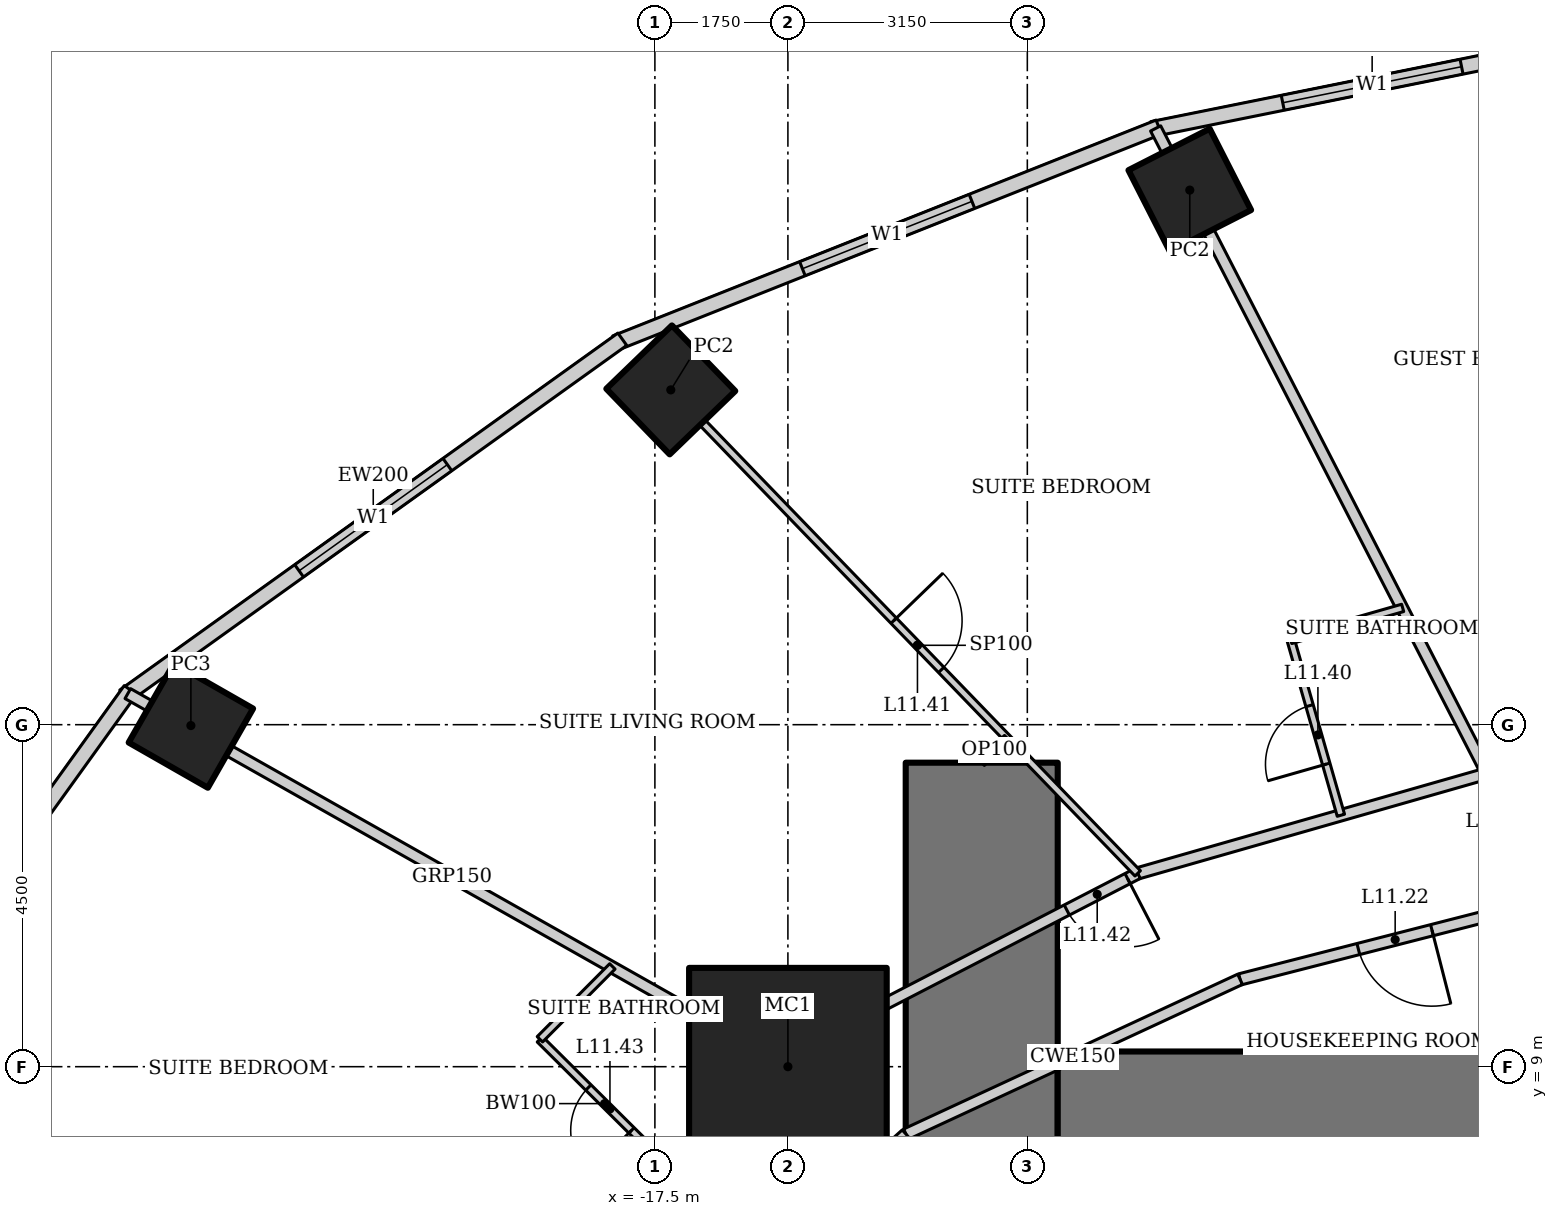
"""IFC4 building model, lengths in metres.
Left out: names, types, materials, properties, quantities, classifications, styles, units other than length and angle.
Written with IfcOpenShell. Run it as: python <this file> out.ifc"""

import sys

from ifc_helpers import new_model, si_unit, direction, frame, frame_2d, origin, origin_2d, place, context, subcontext, project, spatial, rectangle, hollow_rectangle, extrude, element, fill, save


model = new_model("IFC4")
c1 = context("Model", 3, precision=1e-05, world=origin(), true_north=direction((0.0, 1.0)))
c2 = subcontext(c1, "Body", "Model", "MODEL_VIEW")
j1 = project(units=[si_unit("LENGTHUNIT", "METRE"), si_unit("PLANEANGLEUNIT", "RADIAN")], contexts=[c1])
p1 = place(None, origin())
s1 = spatial("IfcSite", under=j1, at=p1, CompositionType="ELEMENT")
p2 = place(p1, origin())
s2 = spatial("IfcBuilding", under=s1, at=p2, CompositionType="ELEMENT")
p3 = place(p2, frame((0.0, 0.0, 55.0)))
s3 = spatial("IfcBuildingStorey", under=s2, at=p3, CompositionType="ELEMENT", Elevation=55.0)
p4 = place(p3, frame((-15.75, 9.0, 0.0), z_axis=(0.0, 0.0, 1.0), x_axis=(1.0, 0.0, 0.0)))
e1 = element("IfcColumn", 1, at=p4, inside=s3, PredefinedType="COLUMN", context=c2, shape_type="SweptSolid", body=[
    extrude(hollow_rectangle(XDim=2.6, YDim=2.6, WallThickness=0.13, at=origin_2d()), origin(), (0.0, 0.0, 1.0), 3.6),
])
for number, where, z_axis, x_axis in (
    (2, (-10.463, 20.534, 0.0), (0.0, 0.0, 1.0), (0.891, 0.454, 0.0)),
    (3, (-17.291, 17.905, 0.0), (0.0, 0.0, 1.0), (0.719, 0.695, 0.0)),
):
    element("IfcColumn", number, at=place(p3, frame(where, z_axis=z_axis, x_axis=x_axis)), inside=s3, PredefinedType="COLUMN", context=c2, shape_type="SweptSolid", body=[
        extrude(hollow_rectangle(XDim=1.2, YDim=1.2, WallThickness=0.1, at=origin_2d()), origin(), (0.0, 0.0, 1.0), 3.6),
    ])
p5 = place(p3, frame((-23.605, 13.489, 0.0), z_axis=(0.0, 0.0, 1.0), x_axis=(0.496139221777, 0.86824298017, 0.0)))
e4 = element("IfcColumn", 4, at=p5, inside=s3, PredefinedType="COLUMN", context=c2, shape_type="SweptSolid", body=[
    extrude(hollow_rectangle(XDim=1.2, YDim=1.2, WallThickness=0.12, at=origin_2d()), origin(), (0.0, 0.0, 1.0), 3.6),
])
p6 = place(p3, frame((-13.2, 13.0, 0.0), z_axis=(0.0, 0.0, 1.0), x_axis=(0.0, -1.0, 0.0)))
e5 = element("IfcWall", 5, at=p6, inside=s3, PredefinedType="SHEAR", context=c2, shape_type="SweptSolid", body=[
    extrude(rectangle(XDim=26.0, YDim=2.0, at=frame_2d((13.0, 0.0))), origin(), (0.0, 0.0, 1.0), 3.6),
])
p7 = place(p6, frame((12.1, 0.0, 0.0)))
e6 = element("IfcOpeningElement", 6, at=p7, cuts=e5, PredefinedType="OPENING", context=c2, shape_type="SweptSolid", body=[
    extrude(rectangle(XDim=1.8, YDim=2.1, at=frame_2d((0.9, 1.05))), frame((0.0, 1.01, 0.0), z_axis=(0.0, -1.0, 0.0), x_axis=(1.0, 0.0, 0.0)), (0.0, 0.0, 1.0), 2.02),
])
p8 = place(p3, frame((12.2, 8.0, 0.0), z_axis=(0.0, 0.0, 1.0), x_axis=(-1.0, 0.0, 0.0)))
e7 = element("IfcWall", 7, at=p8, inside=s3, PredefinedType="SHEAR", context=c2, shape_type="SweptSolid", body=[
    extrude(rectangle(XDim=24.4, YDim=2.4, at=frame_2d((12.2, 0.0))), origin(), (0.0, 0.0, 1.0), 3.6),
])
p9 = place(p3, frame((-5.17, 22.504, 0.0), z_axis=(0.0, 0.0, 1.0), x_axis=(-0.980251657452, -0.197754110105, 0.0)))
e8 = element("IfcWall", 8, at=p9, inside=s3, PredefinedType="SOLIDWALL", context=c2, shape_type="SweptSolid", body=[
    extrude(rectangle(XDim=5.904, YDim=0.2, at=frame_2d((2.952, 0.0))), origin(), (0.0, 0.0, 1.0), 3.45),
])
p10 = place(p9, frame((1.752, 0.0, 0.5)))
e9 = element("IfcOpeningElement", 9, at=p10, cuts=e8, PredefinedType="OPENING", context=c2, shape_type="SweptSolid", body=[
    extrude(rectangle(XDim=2.4, YDim=2.2, at=frame_2d((1.2, 1.1))), frame((0.0, 0.11, 0.0), z_axis=(0.0, -1.0, 0.0), x_axis=(1.0, 0.0, 0.0)), (0.0, 0.0, 1.0), 0.22),
])
p11 = place(p3, frame((-10.869, 21.363, 0.0), z_axis=(0.0, 0.0, 1.0), x_axis=(-0.929358351251, -0.369178892895, 0.0)))
e10 = element("IfcWall", 10, at=p11, inside=s3, PredefinedType="SOLIDWALL", context=c2, shape_type="SweptSolid", body=[
    extrude(rectangle(XDim=7.692, YDim=0.2, at=frame_2d((3.846, 0.0))), origin(), (0.0, 0.0, 1.0), 3.45),
])
p12 = place(p11, frame((2.646, 0.0, 0.5)))
e11 = element("IfcOpeningElement", 11, at=p12, cuts=e10, PredefinedType="OPENING", context=c2, shape_type="SweptSolid", body=[
    extrude(rectangle(XDim=2.4, YDim=2.2, at=frame_2d((1.2, 1.1))), frame((0.0, 0.11, 0.0), z_axis=(0.0, -1.0, 0.0), x_axis=(1.0, 0.0, 0.0)), (0.0, 0.0, 1.0), 0.22),
])
p13 = place(p3, frame((-17.929, 18.572, 0.0), z_axis=(0.0, 0.0, 1.0), x_axis=(-0.812791321576, -0.582554948112, 0.0)))
e12 = element("IfcWall", 12, at=p13, inside=s3, PredefinedType="SOLIDWALL", context=c2, shape_type="SweptSolid", body=[
    extrude(rectangle(XDim=8.063, YDim=0.2, at=frame_2d((4.032, 0.0))), origin(), (0.0, 0.0, 1.0), 3.45),
])
p14 = place(p13, frame((2.832, 0.0, 0.5)))
e13 = element("IfcOpeningElement", 13, at=p14, cuts=e12, PredefinedType="OPENING", context=c2, shape_type="SweptSolid", body=[
    extrude(rectangle(XDim=2.4, YDim=2.2, at=frame_2d((1.2, 1.1))), frame((0.0, 0.11, 0.0), z_axis=(0.0, -1.0, 0.0), x_axis=(1.0, 0.0, 0.0)), (0.0, 0.0, 1.0), 0.22),
])
p15 = place(p3, frame((-24.4, 13.957, 0.0), z_axis=(0.0, 0.0, 1.0), x_axis=(-0.583937613703, -0.811798536155, 0.0)))
e14 = element("IfcWall", 14, at=p15, inside=s3, PredefinedType="SOLIDWALL", context=c2, shape_type="SweptSolid", body=[
    extrude(rectangle(XDim=8.323, YDim=0.2, at=frame_2d((4.162, 0.0))), origin(), (0.0, 0.0, 1.0), 3.45),
])
p16 = place(p15, frame((2.961, 0.0, 0.5)))
e15 = element("IfcOpeningElement", 15, at=p16, cuts=e14, PredefinedType="OPENING", context=c2, shape_type="SweptSolid", body=[
    extrude(rectangle(XDim=2.4, YDim=2.2, at=frame_2d((1.2, 1.1))), frame((0.0, 0.11, 0.0), z_axis=(0.0, -1.0, 0.0), x_axis=(1.0, 0.0, 0.0)), (0.0, 0.0, 1.0), 0.22),
])
p17 = place(p3, frame((-10.912, 21.346, 0.0), z_axis=(0.0, 0.0, 1.0), x_axis=(0.456950233066, -0.889492262193, 0.0)))
e16 = element("IfcWall", 16, at=p17, inside=s3, PredefinedType="PARTITIONING", context=c2, shape_type="SweptSolid", body=[
    extrude(rectangle(XDim=9.542, YDim=0.15, at=frame_2d((4.771, 0.0))), origin(), (0.0, 0.0, 1.0), 2.528),
])
p18 = place(p3, frame((-24.435, 13.909, 0.0), z_axis=(0.0, 0.0, 1.0), x_axis=(0.870612006791, -0.491970256856, 0.0)))
e17 = element("IfcWall", 17, at=p18, inside=s3, PredefinedType="PARTITIONING", context=c2, shape_type="SweptSolid", body=[
    extrude(rectangle(XDim=9.802, YDim=0.15, at=frame_2d((4.901, 0.0))), origin(), (0.0, 0.0, 1.0), 2.693),
])
p19 = place(p3, frame((-6.552, 12.858, 0.0), z_axis=(0.0, 0.0, 1.0), x_axis=(-0.961464178199, -0.27493023486, 0.0)))
e18 = element("IfcWall", 18, at=p19, inside=s3, PredefinedType="PARTITIONING", context=c2, shape_type="SweptSolid", body=[
    extrude(rectangle(XDim=4.78, YDim=0.15, at=frame_2d((2.39, 0.0))), origin(), (0.0, 0.0, 1.0), 3.45),
])
p20 = place(p3, frame((-11.147, 11.544, 0.0), z_axis=(0.0, 0.0, 1.0), x_axis=(-0.888333171507, -0.459199495209, 0.0)))
e19 = element("IfcWall", 19, at=p20, inside=s3, PredefinedType="PARTITIONING", context=c2, shape_type="SweptSolid", body=[
    extrude(rectangle(XDim=5.351, YDim=0.15, at=frame_2d((2.676, 0.0))), origin(), (0.0, 0.0, 1.0), 3.45),
])
p21 = place(p20, frame((0.15, 0.0, 0.0)))
e20 = element("IfcOpeningElement", 20, at=p21, cuts=e19, PredefinedType="OPENING", context=c2, shape_type="SweptSolid", body=[
    extrude(rectangle(XDim=0.9, YDim=2.1, at=frame_2d((0.45, 1.05))), frame((0.0, 0.085, 0.0), z_axis=(0.0, -1.0, 0.0), x_axis=(1.0, 0.0, 0.0)), (0.0, 0.0, 1.0), 0.17),
])
p22 = place(p3, frame((-15.901, 9.086, 0.0), z_axis=(0.0, 0.0, 1.0), x_axis=(-0.705121546414, -0.709086457904, 0.0)))
e21 = element("IfcWall", 21, at=p22, inside=s3, PredefinedType="PARTITIONING", context=c2, shape_type="SweptSolid", body=[
    extrude(rectangle(XDim=5.788, YDim=0.15, at=frame_2d((2.894, 0.0))), origin(), (0.0, 0.0, 1.0), 3.45),
])
p23 = place(p3, frame((-5.706, 11.198, 0.0), z_axis=(0.0, 0.0, 1.0), x_axis=(-0.968705891355, -0.248211393886, 0.0)))
e22 = element("IfcWall", 22, at=p23, inside=s3, PredefinedType="PARTITIONING", context=c2, shape_type="SweptSolid", body=[
    extrude(rectangle(XDim=4.228, YDim=0.15, at=frame_2d((2.114, 0.0))), origin(), (0.0, 0.0, 1.0), 3.45),
])
p24 = place(p23, frame((1.621, 0.0, 0.0)))
e23 = element("IfcOpeningElement", 23, at=p24, cuts=e22, PredefinedType="OPENING", context=c2, shape_type="SweptSolid", body=[
    extrude(rectangle(XDim=1.0, YDim=2.1, at=frame_2d((0.5, 1.05))), frame((0.0, 0.085, 0.0), z_axis=(0.0, -1.0, 0.0), x_axis=(1.0, 0.0, 0.0)), (0.0, 0.0, 1.0), 0.17),
])
p25 = place(p3, frame((-9.801, 10.149, 0.0), z_axis=(0.0, 0.0, 1.0), x_axis=(-0.907279653965, -0.420527798727, 0.0)))
e24 = element("IfcWall", 24, at=p25, inside=s3, PredefinedType="PARTITIONING", context=c2, shape_type="SweptSolid", body=[
    extrude(rectangle(XDim=4.844, YDim=0.15, at=frame_2d((2.422, 0.0))), origin(), (0.0, 0.0, 1.0), 3.45),
])
p26 = place(p3, frame((-14.196, 8.112, 0.0), z_axis=(0.0, 0.0, 1.0), x_axis=(-0.742194222, -0.670184852731, 0.0)))
e25 = element("IfcWall", 25, at=p26, inside=s3, PredefinedType="PARTITIONING", context=c2, shape_type="SweptSolid", body=[
    extrude(rectangle(XDim=5.347, YDim=0.15, at=frame_2d((2.673, 0.0))), origin(), (0.0, 0.0, 1.0), 3.45),
])
p27 = place(p26, frame((2.173, 0.0, 0.0)))
e26 = element("IfcOpeningElement", 26, at=p27, cuts=e25, PredefinedType="OPENING", context=c2, shape_type="SweptSolid", body=[
    extrude(rectangle(XDim=1.0, YDim=2.1, at=frame_2d((0.5, 1.05))), frame((0.0, 0.085, 0.0), z_axis=(0.0, -1.0, 0.0), x_axis=(1.0, 0.0, 0.0)), (0.0, 0.0, 1.0), 0.17),
])
p28 = place(p3, frame((-8.474, 12.308, 0.0), z_axis=(0.0, 0.0, 1.0), x_axis=(-0.27497640313, 0.961450975205, 0.0)))
e27 = element("IfcWall", 27, at=p28, inside=s3, PredefinedType="PARTITIONING", context=c2, shape_type="SweptSolid", body=[
    extrude(rectangle(XDim=2.4, YDim=0.1, at=frame_2d((1.2, 0.0))), origin(), (0.0, 0.0, 1.0), 3.45),
])
p29 = place(p28, frame((0.7, 0.0, 0.0)))
e28 = element("IfcOpeningElement", 28, at=p29, cuts=e27, PredefinedType="OPENING", context=c2, shape_type="SweptSolid", body=[
    extrude(rectangle(XDim=0.8, YDim=2.1, at=frame_2d((0.4, 1.05))), frame((0.0, 0.06, 0.0), z_axis=(0.0, -1.0, 0.0), x_axis=(1.0, 0.0, 0.0)), (0.0, 0.0, 1.0), 0.12),
])
p30 = place(p3, frame((-9.134, 14.615, 0.0), z_axis=(0.0, 0.0, 1.0), x_axis=(0.96145775668, 0.274952690695, 0.0)))
e29 = element("IfcWall", 29, at=p30, inside=s3, PredefinedType="PARTITIONING", context=c2, shape_type="SweptSolid", body=[
    extrude(rectangle(XDim=1.532, YDim=0.1, at=frame_2d((0.766, 0.0))), origin(), (0.0, 0.0, 1.0), 3.45),
])
p31 = place(p3, frame((-16.944, 17.545, 0.0), z_axis=(0.0, 0.0, 1.0), x_axis=(0.694680670522, -0.71931826475, 0.0)))
e30 = element("IfcWall", 30, at=p31, inside=s3, PredefinedType="PARTITIONING", context=c2, shape_type="SweptSolid", body=[
    extrude(rectangle(XDim=8.344, YDim=0.1, at=frame_2d((4.172, 0.0))), origin(), (0.0, 0.0, 1.0), 2.528),
])
p32 = place(p31, frame((3.722, 0.0, 0.0)))
e31 = element("IfcOpeningElement", 31, at=p32, cuts=e30, PredefinedType="OPENING", context=c2, shape_type="SweptSolid", body=[
    extrude(rectangle(XDim=0.9, YDim=2.1, at=frame_2d((0.45, 1.05))), frame((0.0, 0.06, 0.0), z_axis=(0.0, -1.0, 0.0), x_axis=(1.0, 0.0, 0.0)), (0.0, 0.0, 1.0), 0.12),
])
p33 = place(p3, frame((-17.311, 7.668, 0.0), z_axis=(0.0, 0.0, 1.0), x_axis=(-0.709138392716, 0.705069315724, 0.0)))
e32 = element("IfcWall", 32, at=p33, inside=s3, PredefinedType="PARTITIONING", context=c2, shape_type="SweptSolid", body=[
    extrude(rectangle(XDim=2.4, YDim=0.1, at=frame_2d((1.2, 0.0))), origin(), (0.0, 0.0, 1.0), 3.45),
])
p34 = place(p33, frame((0.7, 0.0, 0.0)))
e33 = element("IfcOpeningElement", 33, at=p34, cuts=e32, PredefinedType="OPENING", context=c2, shape_type="SweptSolid", body=[
    extrude(rectangle(XDim=0.8, YDim=2.1, at=frame_2d((0.4, 1.05))), frame((0.0, 0.06, 0.0), z_axis=(0.0, -1.0, 0.0), x_axis=(1.0, 0.0, 0.0)), (0.0, 0.0, 1.0), 0.12),
])
p35 = place(p3, frame((-19.013, 9.36, 0.0), z_axis=(0.0, 0.0, 1.0), x_axis=(0.7051187611, 0.709089227633, 0.0)))
e34 = element("IfcWall", 34, at=p35, inside=s3, PredefinedType="PARTITIONING", context=c2, shape_type="SweptSolid", body=[
    extrude(rectangle(XDim=1.353, YDim=0.1, at=frame_2d((0.676, 0.0))), origin(), (0.0, 0.0, 1.0), 3.45),
])
p36 = place(p3, frame((-13.2, 13.0, 0.0), z_axis=(0.0, 0.0, 1.0), x_axis=(0.719347134512, 0.69465077562, 0.0)))
e35 = element("IfcWall", 35, at=p36, inside=s3, PredefinedType="PARTITIONING", context=c2, shape_type="SweptSolid", body=[
    extrude(rectangle(XDim=0.465, YDim=0.1, at=frame_2d((0.232, 0.0))), origin(), (0.0, 0.0, 1.0), 3.45),
])
p37 = place(p10, origin())
e36 = element("IfcWindow", 36, at=p37, inside=s3, PartitioningType="SINGLE_PANEL", PredefinedType="WINDOW", context=c2, shape_type="SweptSolid", body=[
    extrude(rectangle(XDim=2.4, YDim=2.2, at=frame_2d((1.2, 1.1))), frame((0.0, 0.03, 0.0), z_axis=(0.0, -1.0, 0.0), x_axis=(1.0, 0.0, 0.0)), (0.0, 0.0, 1.0), 0.06),
])
fill(e9, e36)
p38 = place(p12, origin())
e37 = element("IfcWindow", 37, at=p38, inside=s3, PartitioningType="SINGLE_PANEL", PredefinedType="WINDOW", context=c2, shape_type="SweptSolid", body=[
    extrude(rectangle(XDim=2.4, YDim=2.2, at=frame_2d((1.2, 1.1))), frame((0.0, 0.03, 0.0), z_axis=(0.0, -1.0, 0.0), x_axis=(1.0, 0.0, 0.0)), (0.0, 0.0, 1.0), 0.06),
])
fill(e11, e37)
p39 = place(p14, origin())
e38 = element("IfcWindow", 38, at=p39, inside=s3, PartitioningType="SINGLE_PANEL", PredefinedType="WINDOW", context=c2, shape_type="SweptSolid", body=[
    extrude(rectangle(XDim=2.4, YDim=2.2, at=frame_2d((1.2, 1.1))), frame((0.0, 0.03, 0.0), z_axis=(0.0, -1.0, 0.0), x_axis=(1.0, 0.0, 0.0)), (0.0, 0.0, 1.0), 0.06),
])
fill(e13, e38)
p40 = place(p24, origin())
e39 = element("IfcDoor", 39, at=p40, inside=s3, OperationType="SINGLE_SWING_LEFT", PredefinedType="DOOR", context=c2, shape_type="SweptSolid", body=[
    extrude(rectangle(XDim=1.0, YDim=2.1, at=frame_2d((0.5, 1.05))), frame((0.0, 0.025, 0.0), z_axis=(0.0, -1.0, 0.0), x_axis=(1.0, 0.0, 0.0)), (0.0, 0.0, 1.0), 0.05),
])
fill(e23, e39)
p41 = place(p29, origin())
e40 = element("IfcDoor", 40, at=p41, inside=s3, OperationType="SINGLE_SWING_LEFT", PredefinedType="DOOR", context=c2, shape_type="SweptSolid", body=[
    extrude(rectangle(XDim=0.8, YDim=2.1, at=frame_2d((0.4, 1.05))), frame((0.0, 0.025, 0.0), z_axis=(0.0, -1.0, 0.0), x_axis=(1.0, 0.0, 0.0)), (0.0, 0.0, 1.0), 0.05),
])
fill(e28, e40)
p42 = place(p32, origin())
e41 = element("IfcDoor", 41, at=p42, inside=s3, OperationType="SINGLE_SWING_LEFT", PredefinedType="DOOR", context=c2, shape_type="SweptSolid", body=[
    extrude(rectangle(XDim=0.9, YDim=2.1, at=frame_2d((0.45, 1.05))), frame((0.0, 0.025, 0.0), z_axis=(0.0, -1.0, 0.0), x_axis=(1.0, 0.0, 0.0)), (0.0, 0.0, 1.0), 0.05),
])
fill(e31, e41)
p43 = place(p21, origin())
e42 = element("IfcDoor", 42, at=p43, inside=s3, OperationType="SINGLE_SWING_LEFT", PredefinedType="DOOR", context=c2, shape_type="SweptSolid", body=[
    extrude(rectangle(XDim=0.9, YDim=2.1, at=frame_2d((0.45, 1.05))), frame((0.0, 0.025, 0.0), z_axis=(0.0, -1.0, 0.0), x_axis=(1.0, 0.0, 0.0)), (0.0, 0.0, 1.0), 0.05),
])
fill(e20, e42)
p44 = place(p34, origin())
e43 = element("IfcDoor", 43, at=p44, inside=s3, OperationType="SINGLE_SWING_LEFT", PredefinedType="DOOR", context=c2, shape_type="SweptSolid", body=[
    extrude(rectangle(XDim=0.8, YDim=2.1, at=frame_2d((0.4, 1.05))), frame((0.0, 0.025, 0.0), z_axis=(0.0, -1.0, 0.0), x_axis=(1.0, 0.0, 0.0)), (0.0, 0.0, 1.0), 0.05),
])
fill(e33, e43)
save(model, sys.argv[1])
